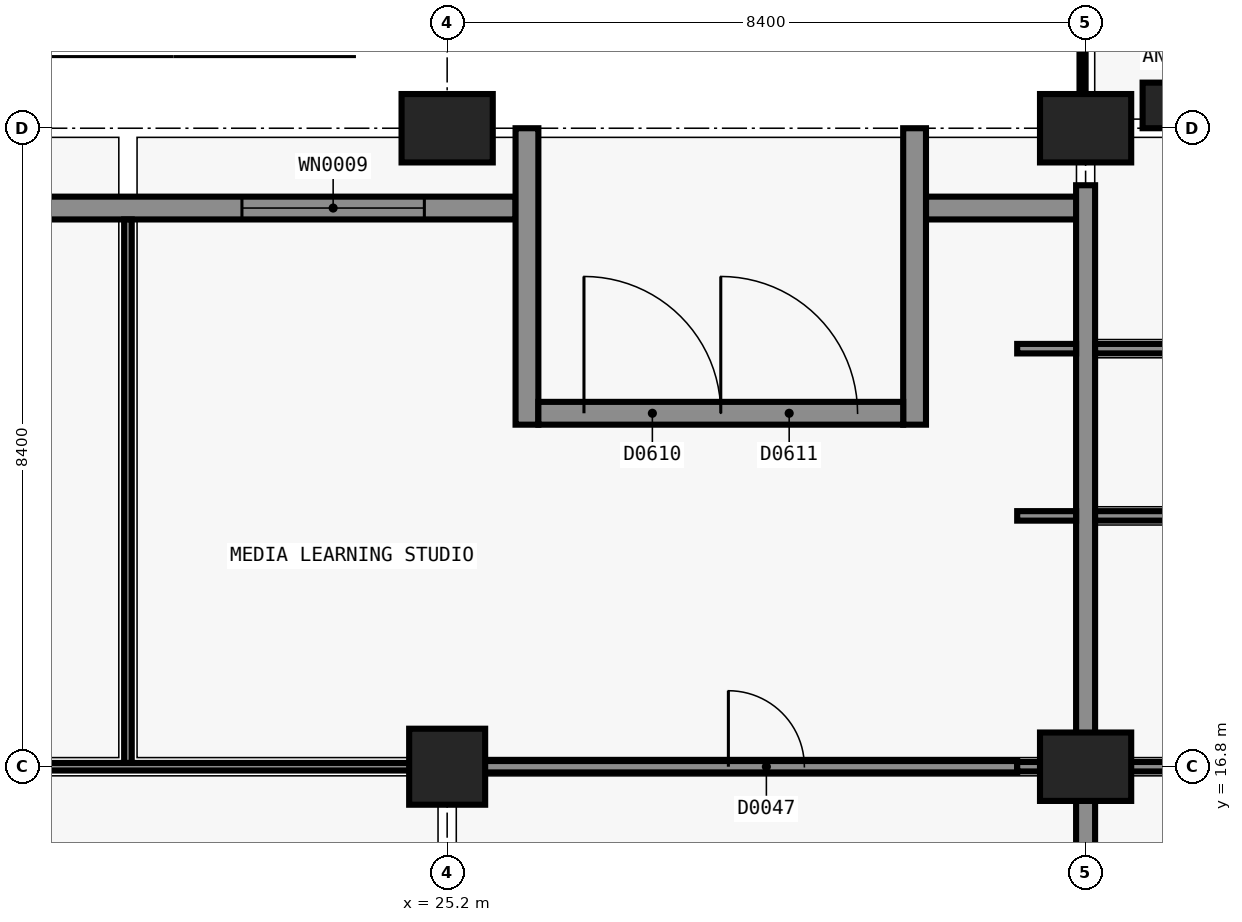
"""IFC4 building model, lengths in metres.
Left out: names, types, materials, properties, quantities, classifications, styles, units other than length and angle.
Written with IfcOpenShell. Run it as: python <this file> out.ifc"""

import sys

from ifc_helpers import new_model, si_unit, direction, frame, frame_2d, origin, origin_2d, place, context, subcontext, project, spatial, rectangle, extrude, element, fill, save


model = new_model("IFC4")
c1 = context("Model", 3, precision=1e-05, world=origin(), true_north=direction((0.0, 1.0)))
c2 = subcontext(c1, "Body", "Model", "MODEL_VIEW")
j1 = project(units=[si_unit("LENGTHUNIT", "METRE"), si_unit("PLANEANGLEUNIT", "RADIAN")], contexts=[c1])
p1 = place(None, origin())
s1 = spatial("IfcSite", under=j1, at=p1, CompositionType="ELEMENT")
p2 = place(p1, origin())
s2 = spatial("IfcBuilding", under=s1, at=p2, CompositionType="ELEMENT")
p3 = place(p2, origin())
s3 = spatial("IfcBuildingStorey", under=s2, at=p3, CompositionType="ELEMENT", Elevation=0.0)
p4 = place(p3, frame((25.2, 16.8, -0.3), z_axis=(0.0, 0.0, 1.0), x_axis=(1.0, 0.0, 0.0)))
e1 = element("IfcColumn", 1, at=p4, inside=s3, PredefinedType="COLUMN", context=c2, shape_type="SweptSolid", body=[
    extrude(rectangle(XDim=1.0, YDim=1.0, at=origin_2d()), origin(), (0.0, 0.0, 1.0), 5.7),
])
for number, where, z_axis, x_axis in (
    (2, (25.2, 25.2, -0.3), (0.0, 0.0, 1.0), (1.0, 0.0, 0.0)),
    (3, (33.6, 16.8, -0.3), (0.0, 0.0, 1.0), (0.0, 1.0, 0.0)),
    (4, (33.6, 25.2, -0.3), (0.0, 0.0, 1.0), (1.0, 0.0, 0.0)),
):
    element("IfcColumn", number, at=place(p3, frame(where, z_axis=z_axis, x_axis=x_axis)), inside=s3, PredefinedType="COLUMN", context=c2, shape_type="SweptSolid", body=[
        extrude(rectangle(XDim=1.2, YDim=0.9, at=origin_2d()), origin(), (0.0, 0.0, 1.0), 5.7),
    ])
p5 = place(p3, frame((34.65, 25.5, -0.3), z_axis=(0.0, 0.0, 1.0), x_axis=(1.0, 0.0, 0.0)))
e5 = element("IfcColumn", 5, at=p5, inside=s3, PredefinedType="COLUMN", context=c2, shape_type="SweptSolid", body=[
    extrude(rectangle(XDim=0.6, YDim=0.6, at=origin_2d()), origin(), (0.0, 0.0, 1.0), 5.7),
])
p6 = place(p3, frame((14.7, 24.15, 0.0), z_axis=(0.0, 0.0, 1.0), x_axis=(1.0, 0.0, 0.0)))
e6 = element("IfcWall", 6, at=p6, inside=s3, PredefinedType="SOLIDWALL", context=c2, shape_type="SweptSolid", body=[
    extrude(rectangle(XDim=11.4, YDim=0.3, at=frame_2d((5.7, 0.0))), origin(), (0.0, 0.0, 1.0), 5.1),
])
p7 = place(p6, frame((1.8, 0.0, 0.45)))
e7 = element("IfcOpeningElement", 7, at=p7, cuts=e6, PredefinedType="OPENING", context=c2, shape_type="SweptSolid", body=[
    extrude(rectangle(XDim=2.4, YDim=3.0, at=frame_2d((1.2, 1.5))), frame((0.0, 0.16, 0.0), z_axis=(0.0, -1.0, 0.0), x_axis=(1.0, 0.0, 0.0)), (0.0, 0.0, 1.0), 0.32),
])
p8 = place(p6, frame((7.8, 0.0, 0.45)))
e8 = element("IfcOpeningElement", 8, at=p8, cuts=e6, PredefinedType="OPENING", context=c2, shape_type="SweptSolid", body=[
    extrude(rectangle(XDim=2.4, YDim=3.0, at=frame_2d((1.2, 1.5))), frame((0.0, 0.16, 0.0), z_axis=(0.0, -1.0, 0.0), x_axis=(1.0, 0.0, 0.0)), (0.0, 0.0, 1.0), 0.32),
])
p9 = place(p3, frame((31.5, 24.15, 0.0), z_axis=(0.0, 0.0, 1.0), x_axis=(1.0, 0.0, 0.0)))
e9 = element("IfcWall", 9, at=p9, inside=s3, PredefinedType="SOLIDWALL", context=c2, shape_type="SweptSolid", body=[
    extrude(rectangle(XDim=2.1, YDim=0.3, at=frame_2d((1.05, 0.0))), origin(), (0.0, 0.0, 1.0), 5.1),
])
for number, where, z_axis, x_axis in (
    (10, (26.25, 21.3, 0.0), (0.0, 0.0, 1.0), (0.0, 1.0, 0.0)),
    (11, (31.35, 21.3, 0.0), (0.0, 0.0, 1.0), (0.0, 1.0, 0.0)),
):
    element("IfcWall", number, at=place(p3, frame(where, z_axis=z_axis, x_axis=x_axis)), inside=s3, PredefinedType="SOLIDWALL", context=c2, shape_type="SweptSolid", body=[
        extrude(rectangle(XDim=3.9, YDim=0.3, at=frame_2d((1.95, 0.0))), origin(), (0.0, 0.0, 1.0), 5.1),
    ])
p10 = place(p3, frame((26.4, 21.45, 0.0), z_axis=(0.0, 0.0, 1.0), x_axis=(1.0, 0.0, 0.0)))
e12 = element("IfcWall", 12, at=p10, inside=s3, PredefinedType="SOLIDWALL", context=c2, shape_type="SweptSolid", body=[
    extrude(rectangle(XDim=4.8, YDim=0.3, at=frame_2d((2.4, 0.0))), origin(), (0.0, 0.0, 1.0), 5.1),
])
p11 = place(p10, frame((0.6, 0.0, 0.0)))
e13 = element("IfcOpeningElement", 13, at=p11, cuts=e12, PredefinedType="OPENING", context=c2, shape_type="SweptSolid", body=[
    extrude(rectangle(XDim=1.8, YDim=2.4, at=frame_2d((0.9, 1.2))), frame((0.0, 0.16, 0.0), z_axis=(0.0, -1.0, 0.0), x_axis=(1.0, 0.0, 0.0)), (0.0, 0.0, 1.0), 0.32),
])
p12 = place(p10, frame((2.4, 0.0, 0.0)))
e14 = element("IfcOpeningElement", 14, at=p12, cuts=e12, PredefinedType="OPENING", context=c2, shape_type="SweptSolid", body=[
    extrude(rectangle(XDim=1.8, YDim=2.4, at=frame_2d((0.9, 1.2))), frame((0.0, 0.16, 0.0), z_axis=(0.0, -1.0, 0.0), x_axis=(1.0, 0.0, 0.0)), (0.0, 0.0, 1.0), 0.32),
])
p13 = place(p3, frame((33.56, 25.2, 0.0), z_axis=(0.0, 0.0, 1.0), x_axis=(0.0, 1.0, 0.0)))
e15 = element("IfcWall", 15, at=p13, inside=s3, PredefinedType="MOVABLE", context=c2, shape_type="SweptSolid", body=[
    extrude(rectangle(XDim=8.4, YDim=0.08, at=frame_2d((4.2, 0.0))), origin(), (0.0, 0.0, 1.0), 3.0),
])
p14 = place(p13, frame((1.35, 0.0, 0.0)))
e16 = element("IfcOpeningElement", 16, at=p14, cuts=e15, PredefinedType="OPENING", context=c2, shape_type="SweptSolid", body=[
    extrude(rectangle(XDim=2.4, YDim=2.4, at=frame_2d((1.2, 1.2))), frame((0.0, 0.05, 0.0), z_axis=(0.0, -1.0, 0.0), x_axis=(1.0, 0.0, 0.0)), (0.0, 0.0, 1.0), 0.1),
])
p15 = place(p13, frame((6.35, 0.0, 0.0)))
e17 = element("IfcOpeningElement", 17, at=p15, cuts=e15, PredefinedType="OPENING", context=c2, shape_type="SweptSolid", body=[
    extrude(rectangle(XDim=1.5, YDim=2.4, at=frame_2d((0.75, 1.2))), frame((0.0, 0.05, 0.0), z_axis=(0.0, -1.0, 0.0), x_axis=(1.0, 0.0, 0.0)), (0.0, 0.0, 1.0), 0.1),
])
p16 = place(p3, frame((33.6, 8.6, 0.0), z_axis=(0.0, 0.0, 1.0), x_axis=(0.0, 1.0, 0.0)))
e18 = element("IfcWall", 18, at=p16, inside=s3, PredefinedType="SOLIDWALL", context=c2, shape_type="SweptSolid", body=[
    extrude(rectangle(XDim=15.85, YDim=0.25, at=frame_2d((7.925, 0.0))), origin(), (0.0, 0.0, 1.0), 4.4),
])
p17 = place(p3, frame((25.125, 16.8, 0.0), z_axis=(0.0, 0.0, 1.0), x_axis=(1.0, 0.0, 0.0)))
e19 = element("IfcWall", 19, at=p17, inside=s3, PredefinedType="PARTITIONING", context=c2, shape_type="SweptSolid", body=[
    extrude(rectangle(XDim=7.575, YDim=0.15, at=frame_2d((3.788, 0.0))), origin(), (0.0, 0.0, 1.0), 4.4),
])
p18 = place(p17, frame((3.775, 0.0, 0.0)))
e20 = element("IfcOpeningElement", 20, at=p18, cuts=e19, PredefinedType="OPENING", context=c2, shape_type="SweptSolid", body=[
    extrude(rectangle(XDim=1.0, YDim=2.1, at=frame_2d((0.5, 1.05))), frame((0.0, 0.085, 0.0), z_axis=(0.0, -1.0, 0.0), x_axis=(1.0, 0.0, 0.0)), (0.0, 0.0, 1.0), 0.17),
])
p19 = place(p3, frame((32.7, 16.8, 0.0), z_axis=(0.0, 0.0, 1.0), x_axis=(1.0, 0.0, 0.0)))
e21 = element("IfcWall", 21, at=p19, inside=s3, PredefinedType="PARTITIONING", context=c2, shape_type="SweptSolid", body=[
    extrude(rectangle(XDim=0.775, YDim=0.125, at=frame_2d((0.388, 0.0))), origin(), (0.0, 0.0, 1.0), 4.4),
])
p20 = place(p3, frame((33.725, 16.8, 0.0), z_axis=(0.0, 0.0, 1.0), x_axis=(1.0, 0.0, 0.0)))
e22 = element("IfcWall", 22, at=p20, inside=s3, PredefinedType="PARTITIONING", context=c2, shape_type="SweptSolid", body=[
    extrude(rectangle(XDim=5.2, YDim=0.125, at=frame_2d((2.6, 0.0))), origin(), (0.0, 0.0, 1.0), 4.4),
])
p21 = place(p20, frame((2.075, 0.0, 0.0)))
e23 = element("IfcOpeningElement", 23, at=p21, cuts=e22, PredefinedType="OPENING", context=c2, shape_type="SweptSolid", body=[
    extrude(rectangle(XDim=1.0, YDim=2.1, at=frame_2d((0.5, 1.05))), frame((0.0, 0.073, 0.0), z_axis=(0.0, -1.0, 0.0), x_axis=(1.0, 0.0, 0.0)), (0.0, 0.0, 1.0), 0.145),
])
p22 = place(p3, frame((32.7, 20.1, 0.0), z_axis=(0.0, 0.0, 1.0), x_axis=(1.0, 0.0, 0.0)))
e24 = element("IfcWall", 24, at=p22, inside=s3, PredefinedType="PARTITIONING", context=c2, shape_type="SweptSolid", body=[
    extrude(rectangle(XDim=0.775, YDim=0.125, at=frame_2d((0.388, 0.0))), origin(), (0.0, 0.0, 1.0), 4.4),
])
p23 = place(p3, frame((33.725, 20.1, 0.0), z_axis=(0.0, 0.0, 1.0), x_axis=(1.0, 0.0, 0.0)))
e25 = element("IfcWall", 25, at=p23, inside=s3, PredefinedType="PARTITIONING", context=c2, shape_type="SweptSolid", body=[
    extrude(rectangle(XDim=5.2, YDim=0.125, at=frame_2d((2.6, 0.0))), origin(), (0.0, 0.0, 1.0), 4.4),
])
p24 = place(p3, frame((32.7, 22.3, 0.0), z_axis=(0.0, 0.0, 1.0), x_axis=(1.0, 0.0, 0.0)))
e26 = element("IfcWall", 26, at=p24, inside=s3, PredefinedType="PARTITIONING", context=c2, shape_type="SweptSolid", body=[
    extrude(rectangle(XDim=0.775, YDim=0.125, at=frame_2d((0.388, 0.0))), origin(), (0.0, 0.0, 1.0), 4.4),
])
p25 = place(p3, frame((33.725, 22.3, 0.0), z_axis=(0.0, 0.0, 1.0), x_axis=(1.0, 0.0, 0.0)))
e27 = element("IfcWall", 27, at=p25, inside=s3, PredefinedType="PARTITIONING", context=c2, shape_type="SweptSolid", body=[
    extrude(rectangle(XDim=5.2, YDim=0.125, at=frame_2d((2.6, 0.0))), origin(), (0.0, 0.0, 1.0), 4.4),
])
p26 = place(p3, frame((12.675, 16.8, 0.0), z_axis=(0.0, 0.0, 1.0), x_axis=(1.0, 0.0, 0.0)))
e28 = element("IfcWall", 28, at=p26, inside=s3, PredefinedType="PARTITIONING", context=c2, shape_type="SweptSolid", body=[
    extrude(rectangle(XDim=12.45, YDim=0.1, at=frame_2d((6.225, 0.0))), origin(), (0.0, 0.0, 1.0), 4.4),
])
p27 = place(p26, frame((4.775, 0.0, 0.0)))
e29 = element("IfcOpeningElement", 29, at=p27, cuts=e28, PredefinedType="OPENING", context=c2, shape_type="SweptSolid", body=[
    extrude(rectangle(XDim=1.0, YDim=2.1, at=frame_2d((0.5, 1.05))), frame((0.0, 0.06, 0.0), z_axis=(0.0, -1.0, 0.0), x_axis=(1.0, 0.0, 0.0)), (0.0, 0.0, 1.0), 0.12),
])
p28 = place(p3, frame((21.0, 16.85, 0.0), z_axis=(0.0, 0.0, 1.0), x_axis=(0.0, 1.0, 0.0)))
e30 = element("IfcWall", 30, at=p28, inside=s3, PredefinedType="PARTITIONING", context=c2, shape_type="SweptSolid", body=[
    extrude(rectangle(XDim=7.15, YDim=0.1, at=frame_2d((3.575, 0.0))), origin(), (0.0, 0.0, 1.0), 4.4),
])
p29 = place(p8, origin())
e31 = element("IfcWindow", 31, at=p29, inside=s3, PartitioningType="SINGLE_PANEL", PredefinedType="WINDOW", context=c2, shape_type="SweptSolid", body=[
    extrude(rectangle(XDim=2.4, YDim=3.0, at=frame_2d((1.2, 1.5))), frame((0.0, 0.03, 0.0), z_axis=(0.0, -1.0, 0.0), x_axis=(1.0, 0.0, 0.0)), (0.0, 0.0, 1.0), 0.06),
])
fill(e8, e31)
p30 = place(p11, origin())
e32 = element("IfcDoor", 32, at=p30, inside=s3, OperationType="SINGLE_SWING_LEFT", PredefinedType="DOOR", context=c2, shape_type="SweptSolid", body=[
    extrude(rectangle(XDim=1.8, YDim=2.4, at=frame_2d((0.9, 1.2))), frame((0.0, 0.025, 0.0), z_axis=(0.0, -1.0, 0.0), x_axis=(1.0, 0.0, 0.0)), (0.0, 0.0, 1.0), 0.05),
])
fill(e13, e32)
p31 = place(p12, origin())
e33 = element("IfcDoor", 33, at=p31, inside=s3, OperationType="SINGLE_SWING_LEFT", PredefinedType="DOOR", context=c2, shape_type="SweptSolid", body=[
    extrude(rectangle(XDim=1.8, YDim=2.4, at=frame_2d((0.9, 1.2))), frame((0.0, 0.025, 0.0), z_axis=(0.0, -1.0, 0.0), x_axis=(1.0, 0.0, 0.0)), (0.0, 0.0, 1.0), 0.05),
])
fill(e14, e33)
p32 = place(p18, origin())
e34 = element("IfcDoor", 34, at=p32, inside=s3, OperationType="SINGLE_SWING_LEFT", PredefinedType="DOOR", context=c2, shape_type="SweptSolid", body=[
    extrude(rectangle(XDim=1.0, YDim=2.1, at=frame_2d((0.5, 1.05))), frame((0.0, 0.025, 0.0), z_axis=(0.0, -1.0, 0.0), x_axis=(1.0, 0.0, 0.0)), (0.0, 0.0, 1.0), 0.05),
])
fill(e20, e34)
save(model, sys.argv[1])
